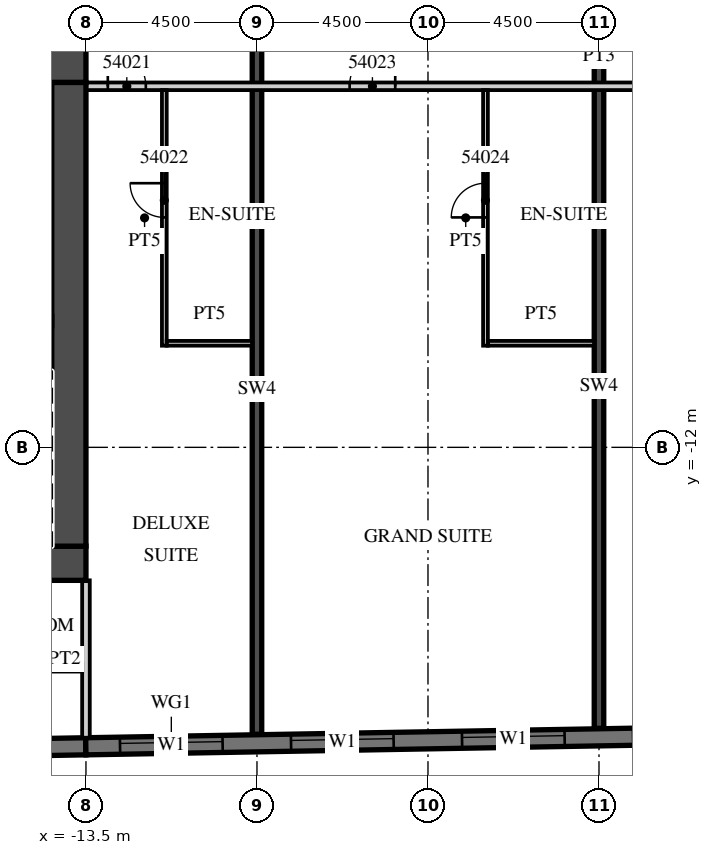
"""IFC4 building model, lengths in metres.
Left out: names, types, materials, properties, quantities, classifications, styles, units other than length and angle.
Written with IfcOpenShell. Run it as: python <this file> out.ifc"""

import sys

from ifc_helpers import new_model, si_unit, direction, frame, frame_2d, origin, place, context, subcontext, project, spatial, rectangle, extrude, element, fill, save


model = new_model("IFC4")
c1 = context("Model", 3, precision=1e-05, world=origin(), true_north=direction((0.0, 1.0)))
c2 = subcontext(c1, "Body", "Model", "MODEL_VIEW")
j1 = project(units=[si_unit("LENGTHUNIT", "METRE"), si_unit("PLANEANGLEUNIT", "RADIAN")], contexts=[c1])
p1 = place(None, origin())
s1 = spatial("IfcSite", under=j1, at=p1, CompositionType="ELEMENT")
p2 = place(p1, origin())
s2 = spatial("IfcBuilding", under=s1, at=p2, CompositionType="ELEMENT")
p3 = place(p2, frame((0.0, 0.0, 224.3)))
s3 = spatial("IfcBuildingStorey", under=s2, at=p3, CompositionType="ELEMENT", Elevation=224.3)
p4 = place(p3, frame((-9.0, -19.55, 0.0), z_axis=(0.0, 0.0, 1.0), x_axis=(0.0, 1.0, 0.0)))
e1 = element("IfcWall", 1, at=p4, inside=s3, PredefinedType="SHEAR", context=c2, shape_type="SweptSolid", body=[
    extrude(rectangle(XDim=18.15, YDim=0.25, at=frame_2d((9.075, 0.0))), origin(), (0.0, 0.0, 1.0), 3.3),
])
p5 = place(p3, frame((0.0, -19.393, 0.0), z_axis=(0.0, 0.0, 1.0), x_axis=(0.0, 1.0, 0.0)))
e2 = element("IfcWall", 2, at=p5, inside=s3, PredefinedType="SHEAR", context=c2, shape_type="SweptSolid", body=[
    extrude(rectangle(XDim=17.993, YDim=0.25, at=frame_2d((8.997, 0.0))), origin(), (0.0, 0.0, 1.0), 3.3),
])
p6 = place(p3, frame((-31.504, -20.18, 0.0), z_axis=(0.0, 0.0, 1.0), x_axis=(0.999847677887, 0.017453395744, 0.0)))
e3 = element("IfcWall", 3, at=p6, inside=s3, PredefinedType="SOLIDWALL", context=c2, shape_type="SweptSolid", body=[
    extrude(rectangle(XDim=18.003, YDim=0.45, at=frame_2d((9.001, 0.0))), origin(), (0.0, 0.0, 1.0), 3.02),
])
p7 = place(p3, frame((-13.504, -19.866, 0.0), z_axis=(0.0, 0.0, 1.0), x_axis=(0.999847672978, 0.017453676992, 0.0)))
e4 = element("IfcWall", 4, at=p7, inside=s3, PredefinedType="SOLIDWALL", context=c2, shape_type="SweptSolid", body=[
    extrude(rectangle(XDim=52.86, YDim=0.45, at=frame_2d((26.43, 0.0))), origin(), (0.0, 0.0, 1.0), 3.02),
])
p8 = place(p7, frame((0.9, 0.0, 0.45)))
e5 = element("IfcOpeningElement", 5, at=p8, cuts=e4, PredefinedType="OPENING", context=c2, shape_type="SweptSolid", body=[
    extrude(rectangle(XDim=2.7, YDim=2.25, at=frame_2d((1.35, 1.125))), frame((0.0, 0.235, 0.0), z_axis=(0.0, -1.0, 0.0), x_axis=(1.0, 0.0, 0.0)), (0.0, 0.0, 1.0), 0.47),
])
p9 = place(p7, frame((5.401, 0.0, 0.45)))
e6 = element("IfcOpeningElement", 6, at=p9, cuts=e4, PredefinedType="OPENING", context=c2, shape_type="SweptSolid", body=[
    extrude(rectangle(XDim=2.7, YDim=2.25, at=frame_2d((1.35, 1.125))), frame((0.0, 0.235, 0.0), z_axis=(0.0, -1.0, 0.0), x_axis=(1.0, 0.0, 0.0)), (0.0, 0.0, 1.0), 0.47),
])
p10 = place(p7, frame((9.902, 0.0, 0.45)))
e7 = element("IfcOpeningElement", 7, at=p10, cuts=e4, PredefinedType="OPENING", context=c2, shape_type="SweptSolid", body=[
    extrude(rectangle(XDim=2.7, YDim=2.25, at=frame_2d((1.35, 1.125))), frame((0.0, 0.235, 0.0), z_axis=(0.0, -1.0, 0.0), x_axis=(1.0, 0.0, 0.0)), (0.0, 0.0, 1.0), 0.47),
])
p11 = place(p7, frame((14.402, 0.0, 0.45)))
e8 = element("IfcOpeningElement", 8, at=p11, cuts=e4, PredefinedType="OPENING", context=c2, shape_type="SweptSolid", body=[
    extrude(rectangle(XDim=2.7, YDim=2.25, at=frame_2d((1.35, 1.125))), frame((0.0, 0.235, 0.0), z_axis=(0.0, -1.0, 0.0), x_axis=(1.0, 0.0, 0.0)), (0.0, 0.0, 1.0), 0.47),
])
p12 = place(p7, frame((18.903, 0.0, 0.45)))
e9 = element("IfcOpeningElement", 9, at=p12, cuts=e4, PredefinedType="OPENING", context=c2, shape_type="SweptSolid", body=[
    extrude(rectangle(XDim=2.7, YDim=2.25, at=frame_2d((1.35, 1.125))), frame((0.0, 0.235, 0.0), z_axis=(0.0, -1.0, 0.0), x_axis=(1.0, 0.0, 0.0)), (0.0, 0.0, 1.0), 0.47),
])
p13 = place(p7, frame((23.404, 0.0, 0.45)))
e10 = element("IfcOpeningElement", 10, at=p13, cuts=e4, PredefinedType="OPENING", context=c2, shape_type="SweptSolid", body=[
    extrude(rectangle(XDim=2.7, YDim=2.25, at=frame_2d((1.35, 1.125))), frame((0.0, 0.235, 0.0), z_axis=(0.0, -1.0, 0.0), x_axis=(1.0, 0.0, 0.0)), (0.0, 0.0, 1.0), 0.47),
])
p14 = place(p7, frame((27.904, 0.0, 0.45)))
e11 = element("IfcOpeningElement", 11, at=p14, cuts=e4, PredefinedType="OPENING", context=c2, shape_type="SweptSolid", body=[
    extrude(rectangle(XDim=2.7, YDim=2.25, at=frame_2d((1.35, 1.125))), frame((0.0, 0.235, 0.0), z_axis=(0.0, -1.0, 0.0), x_axis=(1.0, 0.0, 0.0)), (0.0, 0.0, 1.0), 0.47),
])
p15 = place(p7, frame((32.405, 0.0, 0.45)))
e12 = element("IfcOpeningElement", 12, at=p15, cuts=e4, PredefinedType="OPENING", context=c2, shape_type="SweptSolid", body=[
    extrude(rectangle(XDim=2.7, YDim=2.25, at=frame_2d((1.35, 1.125))), frame((0.0, 0.235, 0.0), z_axis=(0.0, -1.0, 0.0), x_axis=(1.0, 0.0, 0.0)), (0.0, 0.0, 1.0), 0.47),
])
p16 = place(p7, frame((36.906, 0.0, 0.45)))
e13 = element("IfcOpeningElement", 13, at=p16, cuts=e4, PredefinedType="OPENING", context=c2, shape_type="SweptSolid", body=[
    extrude(rectangle(XDim=2.7, YDim=2.25, at=frame_2d((1.35, 1.125))), frame((0.0, 0.235, 0.0), z_axis=(0.0, -1.0, 0.0), x_axis=(1.0, 0.0, 0.0)), (0.0, 0.0, 1.0), 0.47),
])
p17 = place(p7, frame((41.406, 0.0, 0.45)))
e14 = element("IfcOpeningElement", 14, at=p17, cuts=e4, PredefinedType="OPENING", context=c2, shape_type="SweptSolid", body=[
    extrude(rectangle(XDim=2.7, YDim=2.25, at=frame_2d((1.35, 1.125))), frame((0.0, 0.235, 0.0), z_axis=(0.0, -1.0, 0.0), x_axis=(1.0, 0.0, 0.0)), (0.0, 0.0, 1.0), 0.47),
])
p18 = place(p7, frame((45.907, 0.0, 0.45)))
e15 = element("IfcOpeningElement", 15, at=p18, cuts=e4, PredefinedType="OPENING", context=c2, shape_type="SweptSolid", body=[
    extrude(rectangle(XDim=2.7, YDim=2.25, at=frame_2d((1.35, 1.125))), frame((0.0, 0.235, 0.0), z_axis=(0.0, -1.0, 0.0), x_axis=(1.0, 0.0, 0.0)), (0.0, 0.0, 1.0), 0.47),
])
p19 = place(p3, frame((-13.5, -19.641, 0.0), z_axis=(0.0, 0.0, 1.0), x_axis=(0.0, 1.0, 0.0)))
e16 = element("IfcWall", 16, at=p19, inside=s3, PredefinedType="PARTITIONING", context=c2, shape_type="SweptSolid", body=[
    extrude(rectangle(XDim=4.141, YDim=0.2, at=frame_2d((2.071, 0.0))), origin(), (0.0, 0.0, 1.0), 3.02),
])
p20 = place(p3, frame((-13.5, -2.5, 0.0), z_axis=(0.0, 0.0, 1.0), x_axis=(1.0, 0.0, 0.0)))
e17 = element("IfcWall", 17, at=p20, inside=s3, PredefinedType="PARTITIONING", context=c2, shape_type="SweptSolid", body=[
    extrude(rectangle(XDim=27.0, YDim=0.2, at=frame_2d((13.5, 0.0))), origin(), (0.0, 0.0, 1.0), 3.02),
])
p21 = place(p20, frame((0.575, 0.0, 0.0)))
e18 = element("IfcOpeningElement", 18, at=p21, cuts=e17, PredefinedType="OPENING", context=c2, shape_type="SweptSolid", body=[
    extrude(rectangle(XDim=1.0, YDim=2.1, at=frame_2d((0.5, 1.05))), frame((0.0, 0.11, 0.0), z_axis=(0.0, -1.0, 0.0), x_axis=(1.0, 0.0, 0.0)), (0.0, 0.0, 1.0), 0.22),
])
p22 = place(p20, frame((6.938, 0.0, 0.0)))
e19 = element("IfcOpeningElement", 19, at=p22, cuts=e17, PredefinedType="OPENING", context=c2, shape_type="SweptSolid", body=[
    extrude(rectangle(XDim=1.2, YDim=2.1, at=frame_2d((0.6, 1.05))), frame((0.0, 0.11, 0.0), z_axis=(0.0, -1.0, 0.0), x_axis=(1.0, 0.0, 0.0)), (0.0, 0.0, 1.0), 0.22),
])
p23 = place(p20, frame((15.938, 0.0, 0.0)))
e20 = element("IfcOpeningElement", 20, at=p23, cuts=e17, PredefinedType="OPENING", context=c2, shape_type="SweptSolid", body=[
    extrude(rectangle(XDim=1.2, YDim=2.1, at=frame_2d((0.6, 1.05))), frame((0.0, 0.11, 0.0), z_axis=(0.0, -1.0, 0.0), x_axis=(1.0, 0.0, 0.0)), (0.0, 0.0, 1.0), 0.22),
])
p24 = place(p20, frame((25.425, 0.0, 0.0)))
e21 = element("IfcOpeningElement", 21, at=p24, cuts=e17, PredefinedType="OPENING", context=c2, shape_type="SweptSolid", body=[
    extrude(rectangle(XDim=1.0, YDim=2.1, at=frame_2d((0.5, 1.05))), frame((0.0, 0.11, 0.0), z_axis=(0.0, -1.0, 0.0), x_axis=(1.0, 0.0, 0.0)), (0.0, 0.0, 1.0), 0.22),
])
p25 = place(p3, frame((-11.438, -9.325, 0.0), z_axis=(0.0, 0.0, 1.0), x_axis=(0.0, 1.0, 0.0)))
e22 = element("IfcWall", 22, at=p25, inside=s3, PredefinedType="PARTITIONING", context=c2, shape_type="SweptSolid", body=[
    extrude(rectangle(XDim=6.725, YDim=0.125, at=frame_2d((3.362, 0.0))), origin(), (0.0, 0.0, 1.0), 3.02),
])
p26 = place(p25, frame((3.375, 0.0, 0.0)))
e23 = element("IfcOpeningElement", 23, at=p26, cuts=e22, PredefinedType="OPENING", context=c2, shape_type="SweptSolid", body=[
    extrude(rectangle(XDim=0.9, YDim=2.1, at=frame_2d((0.45, 1.05))), frame((0.0, 0.073, 0.0), z_axis=(0.0, -1.0, 0.0), x_axis=(1.0, 0.0, 0.0)), (0.0, 0.0, 1.0), 0.145),
])
p27 = place(p3, frame((-11.375, -9.262, 0.0), z_axis=(0.0, 0.0, 1.0), x_axis=(1.0, 0.0, 0.0)))
e24 = element("IfcWall", 24, at=p27, inside=s3, PredefinedType="PARTITIONING", context=c2, shape_type="SweptSolid", body=[
    extrude(rectangle(XDim=2.25, YDim=0.125, at=frame_2d((1.125, 0.0))), origin(), (0.0, 0.0, 1.0), 3.02),
])
p28 = place(p3, frame((-2.987, -9.325, 0.0), z_axis=(0.0, 0.0, 1.0), x_axis=(0.0, 1.0, 0.0)))
e25 = element("IfcWall", 25, at=p28, inside=s3, PredefinedType="PARTITIONING", context=c2, shape_type="SweptSolid", body=[
    extrude(rectangle(XDim=6.725, YDim=0.125, at=frame_2d((3.362, 0.0))), origin(), (0.0, 0.0, 1.0), 3.02),
])
p29 = place(p28, frame((3.375, 0.0, 0.0)))
e26 = element("IfcOpeningElement", 26, at=p29, cuts=e25, PredefinedType="OPENING", context=c2, shape_type="SweptSolid", body=[
    extrude(rectangle(XDim=0.9, YDim=2.1, at=frame_2d((0.45, 1.05))), frame((0.0, 0.073, 0.0), z_axis=(0.0, -1.0, 0.0), x_axis=(1.0, 0.0, 0.0)), (0.0, 0.0, 1.0), 0.145),
])
p30 = place(p3, frame((-2.925, -9.262, 0.0), z_axis=(0.0, 0.0, 1.0), x_axis=(1.0, 0.0, 0.0)))
e27 = element("IfcWall", 27, at=p30, inside=s3, PredefinedType="PARTITIONING", context=c2, shape_type="SweptSolid", body=[
    extrude(rectangle(XDim=2.8, YDim=0.125, at=frame_2d((1.4, 0.0))), origin(), (0.0, 0.0, 1.0), 3.02),
])
p31 = place(p3, frame((-31.5, -1.95, 0.0), z_axis=(0.0, 0.0, 1.0), x_axis=(1.0, 0.0, 0.0)))
e28 = element("IfcWall", 28, at=p31, inside=s3, PredefinedType="SHEAR", context=c2, shape_type="SweptSolid", body=[
    extrude(rectangle(XDim=18.0, YDim=0.9, at=frame_2d((9.0, 0.0))), origin(), (0.0, 0.0, 1.0), 3.02),
])
p32 = place(p31, frame((14.725, 0.0, 0.0)))
e29 = element("IfcOpeningElement", 29, at=p32, cuts=e28, PredefinedType="OPENING", context=c2, shape_type="SweptSolid", body=[
    extrude(rectangle(XDim=1.8, YDim=2.1, at=frame_2d((0.9, 1.05))), frame((0.0, 0.46, 0.0), z_axis=(0.0, -1.0, 0.0), x_axis=(1.0, 0.0, 0.0)), (0.0, 0.0, 1.0), 0.92),
])
p33 = place(p3, frame((-20.3, -15.05, 0.0), z_axis=(0.0, 0.0, 1.0), x_axis=(1.0, 0.0, 0.0)))
e30 = element("IfcWall", 30, at=p33, inside=s3, PredefinedType="SHEAR", context=c2, shape_type="SweptSolid", body=[
    extrude(rectangle(XDim=6.8, YDim=0.9, at=frame_2d((3.4, 0.0))), origin(), (0.0, 0.0, 1.0), 3.02),
])
p34 = place(p33, frame((0.875, 0.0, 0.0)))
e31 = element("IfcOpeningElement", 31, at=p34, cuts=e30, PredefinedType="OPENING", context=c2, shape_type="SweptSolid", body=[
    extrude(rectangle(XDim=1.2, YDim=2.1, at=frame_2d((0.6, 1.05))), frame((0.0, 0.46, 0.0), z_axis=(0.0, -1.0, 0.0), x_axis=(1.0, 0.0, 0.0)), (0.0, 0.0, 1.0), 0.92),
])
p35 = place(p3, frame((-13.95, -14.6, 0.0), z_axis=(0.0, 0.0, 1.0), x_axis=(0.0, 1.0, 0.0)))
e32 = element("IfcWall", 32, at=p35, inside=s3, PredefinedType="SHEAR", context=c2, shape_type="SweptSolid", body=[
    extrude(rectangle(XDim=12.2, YDim=0.9, at=frame_2d((6.1, 0.0))), origin(), (0.0, 0.0, 1.0), 3.02),
])
p36 = place(p3, frame((-35.864, -17.8, 0.0), z_axis=(0.0, 0.0, 1.0), x_axis=(1.0, 0.0, 0.0)))
e33 = element("IfcWall", 33, at=p36, inside=s3, PredefinedType="PARTITIONING", context=c2, shape_type="SweptSolid", body=[
    extrude(rectangle(XDim=22.264, YDim=0.2, at=frame_2d((11.132, 0.0))), origin(), (0.0, 0.0, 1.0), 3.02),
])
p37 = place(p36, frame((4.751, 0.0, 0.0)))
e34 = element("IfcOpeningElement", 34, at=p37, cuts=e33, PredefinedType="OPENING", context=c2, shape_type="SweptSolid", body=[
    extrude(rectangle(XDim=0.9, YDim=2.1, at=frame_2d((0.45, 1.05))), frame((0.0, 0.11, 0.0), z_axis=(0.0, -1.0, 0.0), x_axis=(1.0, 0.0, 0.0)), (0.0, 0.0, 1.0), 0.22),
])
p38 = place(p36, frame((13.051, 0.0, 0.0)))
e35 = element("IfcOpeningElement", 35, at=p38, cuts=e33, PredefinedType="OPENING", context=c2, shape_type="SweptSolid", body=[
    extrude(rectangle(XDim=0.9, YDim=2.1, at=frame_2d((0.45, 1.05))), frame((0.0, 0.11, 0.0), z_axis=(0.0, -1.0, 0.0), x_axis=(1.0, 0.0, 0.0)), (0.0, 0.0, 1.0), 0.22),
])
p39 = place(p8, origin())
e36 = element("IfcWindow", 36, at=p39, inside=s3, PartitioningType="SINGLE_PANEL", PredefinedType="WINDOW", context=c2, shape_type="SweptSolid", body=[
    extrude(rectangle(XDim=2.7, YDim=2.25, at=frame_2d((1.35, 1.125))), frame((0.0, 0.09, 0.0), z_axis=(0.0, -1.0, 0.0), x_axis=(1.0, 0.0, 0.0)), (0.0, 0.0, 1.0), 0.06),
])
fill(e5, e36)
p40 = place(p9, origin())
e37 = element("IfcWindow", 37, at=p40, inside=s3, PartitioningType="SINGLE_PANEL", PredefinedType="WINDOW", context=c2, shape_type="SweptSolid", body=[
    extrude(rectangle(XDim=2.7, YDim=2.25, at=frame_2d((1.35, 1.125))), frame((0.0, 0.09, 0.0), z_axis=(0.0, -1.0, 0.0), x_axis=(1.0, 0.0, 0.0)), (0.0, 0.0, 1.0), 0.06),
])
fill(e6, e37)
p41 = place(p10, origin())
e38 = element("IfcWindow", 38, at=p41, inside=s3, PartitioningType="SINGLE_PANEL", PredefinedType="WINDOW", context=c2, shape_type="SweptSolid", body=[
    extrude(rectangle(XDim=2.7, YDim=2.25, at=frame_2d((1.35, 1.125))), frame((0.0, 0.09, 0.0), z_axis=(0.0, -1.0, 0.0), x_axis=(1.0, 0.0, 0.0)), (0.0, 0.0, 1.0), 0.06),
])
fill(e7, e38)
p42 = place(p21, origin())
e39 = element("IfcDoor", 39, at=p42, inside=s3, OperationType="SINGLE_SWING_LEFT", PredefinedType="DOOR", context=c2, shape_type="SweptSolid", body=[
    extrude(rectangle(XDim=1.0, YDim=2.1, at=frame_2d((0.5, 1.05))), frame((0.0, 0.025, 0.0), z_axis=(0.0, -1.0, 0.0), x_axis=(1.0, 0.0, 0.0)), (0.0, 0.0, 1.0), 0.05),
])
fill(e18, e39)
p43 = place(p26, origin())
e40 = element("IfcDoor", 40, at=p43, inside=s3, OperationType="SINGLE_SWING_RIGHT", PredefinedType="DOOR", context=c2, shape_type="SweptSolid", body=[
    extrude(rectangle(XDim=0.9, YDim=2.1, at=frame_2d((0.45, 1.05))), frame((0.0, 0.025, 0.0), z_axis=(0.0, -1.0, 0.0), x_axis=(1.0, 0.0, 0.0)), (0.0, 0.0, 1.0), 0.05),
])
fill(e23, e40)
p44 = place(p22, origin())
e41 = element("IfcDoor", 41, at=p44, inside=s3, OperationType="SINGLE_SWING_RIGHT", PredefinedType="DOOR", context=c2, shape_type="SweptSolid", body=[
    extrude(rectangle(XDim=1.2, YDim=2.1, at=frame_2d((0.6, 1.05))), frame((0.0, 0.025, 0.0), z_axis=(0.0, -1.0, 0.0), x_axis=(1.0, 0.0, 0.0)), (0.0, 0.0, 1.0), 0.05),
])
fill(e19, e41)
p45 = place(p29, origin())
e42 = element("IfcDoor", 42, at=p45, inside=s3, OperationType="SINGLE_SWING_LEFT", PredefinedType="DOOR", context=c2, shape_type="SweptSolid", body=[
    extrude(rectangle(XDim=0.9, YDim=2.1, at=frame_2d((0.45, 1.05))), frame((0.0, 0.025, 0.0), z_axis=(0.0, -1.0, 0.0), x_axis=(1.0, 0.0, 0.0)), (0.0, 0.0, 1.0), 0.05),
])
fill(e26, e42)
save(model, sys.argv[1])
